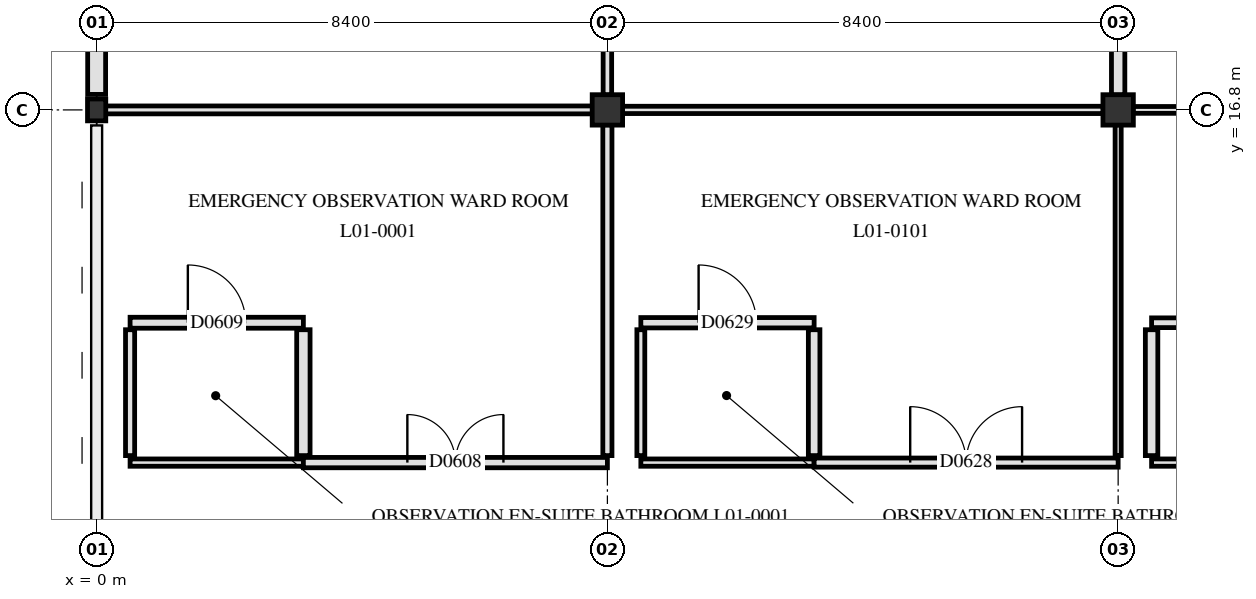
"""IFC4 building model, lengths in metres.
Left out: names, types, materials, properties, quantities, classifications, styles, units other than length and angle.
Written with IfcOpenShell. Run it as: python <this file> out.ifc"""

import sys

from ifc_helpers import new_model, si_unit, direction, frame, frame_2d, origin, origin_2d, place, context, subcontext, project, spatial, rectangle, i_section, extrude, element, fill, save


model = new_model("IFC4")
c1 = context("Model", 3, precision=1e-05, world=origin(), true_north=direction((0.0, 1.0)))
c2 = subcontext(c1, "Body", "Model", "MODEL_VIEW")
j1 = project(units=[si_unit("LENGTHUNIT", "METRE"), si_unit("PLANEANGLEUNIT", "RADIAN")], contexts=[c1])
p1 = place(None, origin())
s1 = spatial("IfcSite", under=j1, at=p1, CompositionType="ELEMENT")
p2 = place(p1, origin())
s2 = spatial("IfcBuilding", under=s1, at=p2, CompositionType="ELEMENT")
p3 = place(p2, frame((0.0, 0.0, 4.8)))
s3 = spatial("IfcBuildingStorey", under=s2, at=p3, CompositionType="ELEMENT", Elevation=4.8)
p4 = place(p3, frame((0.0, 16.8, 0.0), z_axis=(0.0, 0.0, 1.0), x_axis=(1.0, 0.0, 0.0)))
e1 = element("IfcColumn", 1, at=p4, inside=s3, PredefinedType="COLUMN", context=c2, shape_type="SweptSolid", body=[
    extrude(i_section(OverallWidth=0.3, OverallDepth=0.36, WebThickness=0.012, FlangeThickness=0.022, FilletRadius=0.027, at=origin_2d()), origin(), (0.0, 0.0, 1.0), 4.5),
])
for number, where, z_axis, x_axis in (
    (2, (8.4, 16.8, 0.0), (0.0, 0.0, 1.0), (1.0, 0.0, 0.0)),
    (3, (16.8, 16.8, 0.0), (0.0, 0.0, 1.0), (1.0, 0.0, 0.0)),
):
    element("IfcColumn", number, at=place(p3, frame(where, z_axis=z_axis, x_axis=x_axis)), inside=s3, PredefinedType="COLUMN", context=c2, shape_type="SweptSolid", body=[
        extrude(rectangle(XDim=0.5, YDim=0.5, at=origin_2d()), origin(), (0.0, 0.0, 1.0), 4.5),
    ])
p5 = place(p3, frame((0.0, 17.055, 0.0), z_axis=(0.0, 0.0, 1.0), x_axis=(0.0, 1.0, 0.0)))
e4 = element("IfcWall", 4, at=p5, inside=s3, PredefinedType="SOLIDWALL", context=c2, shape_type="SweptSolid", body=[
    extrude(rectangle(XDim=7.89, YDim=0.295, at=frame_2d((3.945, 0.0))), origin(), (0.0, 0.0, 1.0), 3.44),
])
p6 = place(p5, frame((1.347, 0.0, 0.85)))
e5 = element("IfcOpeningElement", 5, at=p6, cuts=e4, PredefinedType="OPENING", context=c2, shape_type="SweptSolid", body=[
    extrude(rectangle(XDim=1.25, YDim=1.3, at=frame_2d((0.625, 0.65))), frame((0.0, 0.157, 0.0), z_axis=(0.0, -1.0, 0.0), x_axis=(1.0, 0.0, 0.0)), (0.0, 0.0, 1.0), 0.315),
])
p7 = place(p5, frame((5.242, 0.0, 0.85)))
e6 = element("IfcOpeningElement", 6, at=p7, cuts=e4, PredefinedType="OPENING", context=c2, shape_type="SweptSolid", body=[
    extrude(rectangle(XDim=1.35, YDim=1.3, at=frame_2d((0.675, 0.65))), frame((0.0, 0.157, 0.0), z_axis=(0.0, -1.0, 0.0), x_axis=(1.0, 0.0, 0.0)), (0.0, 0.0, 1.0), 0.315),
])
p8 = place(p3, frame((0.55, 11.0, 0.0), z_axis=(0.0, 0.0, 1.0), x_axis=(1.0, 0.0, 0.0)))
e7 = element("IfcWall", 7, at=p8, inside=s3, PredefinedType="PARTITIONING", context=c2, shape_type="SweptSolid", body=[
    extrude(rectangle(XDim=2.85, YDim=0.12, at=frame_2d((1.425, 0.0))), origin(), (0.0, 0.0, 1.0), 4.14),
])
p9 = place(p3, frame((3.4, 11.0, 0.0), z_axis=(0.0, 0.0, 1.0), x_axis=(1.0, 0.0, 0.0)))
e8 = element("IfcWall", 8, at=p9, inside=s3, PredefinedType="PARTITIONING", context=c2, shape_type="SweptSolid", body=[
    extrude(rectangle(XDim=5.0, YDim=0.17, at=frame_2d((2.5, 0.0))), origin(), (0.0, 0.0, 1.0), 3.59),
])
p10 = place(p9, frame((1.71, 0.0, 0.0)))
e9 = element("IfcOpeningElement", 9, at=p10, cuts=e8, PredefinedType="OPENING", context=c2, shape_type="SweptSolid", body=[
    extrude(rectangle(XDim=1.58, YDim=2.22, at=frame_2d((0.79, 1.11))), frame((0.0, 0.095, 0.0), z_axis=(0.0, -1.0, 0.0), x_axis=(1.0, 0.0, 0.0)), (0.0, 0.0, 1.0), 0.19),
])
p11 = place(p3, frame((8.95, 11.0, 0.0), z_axis=(0.0, 0.0, 1.0), x_axis=(1.0, 0.0, 0.0)))
e10 = element("IfcWall", 10, at=p11, inside=s3, PredefinedType="PARTITIONING", context=c2, shape_type="SweptSolid", body=[
    extrude(rectangle(XDim=2.85, YDim=0.12, at=frame_2d((1.425, 0.0))), origin(), (0.0, 0.0, 1.0), 4.14),
])
p12 = place(p3, frame((11.8, 11.0, 0.0), z_axis=(0.0, 0.0, 1.0), x_axis=(1.0, 0.0, 0.0)))
e11 = element("IfcWall", 11, at=p12, inside=s3, PredefinedType="PARTITIONING", context=c2, shape_type="SweptSolid", body=[
    extrude(rectangle(XDim=5.0, YDim=0.15, at=frame_2d((2.5, 0.0))), origin(), (0.0, 0.0, 1.0), 3.59),
])
p13 = place(p12, frame((1.58, 0.0, 0.0)))
e12 = element("IfcOpeningElement", 12, at=p13, cuts=e11, PredefinedType="OPENING", context=c2, shape_type="SweptSolid", body=[
    extrude(rectangle(XDim=1.84, YDim=2.28, at=frame_2d((0.92, 1.14))), frame((0.0, 0.085, 0.0), z_axis=(0.0, -1.0, 0.0), x_axis=(1.0, 0.0, 0.0)), (0.0, 0.0, 1.0), 0.17),
])
p14 = place(p3, frame((17.35, 11.0, 0.0), z_axis=(0.0, 0.0, 1.0), x_axis=(1.0, 0.0, 0.0)))
e13 = element("IfcWall", 13, at=p14, inside=s3, PredefinedType="PARTITIONING", context=c2, shape_type="SweptSolid", body=[
    extrude(rectangle(XDim=2.85, YDim=0.12, at=frame_2d((1.425, 0.0))), origin(), (0.0, 0.0, 1.0), 4.14),
])
p15 = place(p3, frame((0.55, 13.3, 0.0), z_axis=(0.0, 0.0, 1.0), x_axis=(1.0, 0.0, 0.0)))
e14 = element("IfcWall", 14, at=p15, inside=s3, PredefinedType="PARTITIONING", context=c2, shape_type="SweptSolid", body=[
    extrude(rectangle(XDim=2.85, YDim=0.18, at=frame_2d((1.425, 0.0))), origin(), (0.0, 0.0, 1.0), 4.14),
])
p16 = place(p15, frame((0.95, 0.0, 0.0)))
e15 = element("IfcOpeningElement", 15, at=p16, cuts=e14, PredefinedType="OPENING", context=c2, shape_type="SweptSolid", body=[
    extrude(rectangle(XDim=0.95, YDim=2.1, at=frame_2d((0.475, 1.05))), frame((0.0, 0.1, 0.0), z_axis=(0.0, -1.0, 0.0), x_axis=(1.0, 0.0, 0.0)), (0.0, 0.0, 1.0), 0.2),
])
p17 = place(p3, frame((8.95, 13.3, 0.0), z_axis=(0.0, 0.0, 1.0), x_axis=(1.0, 0.0, 0.0)))
e16 = element("IfcWall", 16, at=p17, inside=s3, PredefinedType="PARTITIONING", context=c2, shape_type="SweptSolid", body=[
    extrude(rectangle(XDim=2.85, YDim=0.17, at=frame_2d((1.425, 0.0))), origin(), (0.0, 0.0, 1.0), 4.14),
])
p18 = place(p17, frame((0.95, 0.0, 0.0)))
e17 = element("IfcOpeningElement", 17, at=p18, cuts=e16, PredefinedType="OPENING", context=c2, shape_type="SweptSolid", body=[
    extrude(rectangle(XDim=0.95, YDim=2.1, at=frame_2d((0.475, 1.05))), frame((0.0, 0.095, 0.0), z_axis=(0.0, -1.0, 0.0), x_axis=(1.0, 0.0, 0.0)), (0.0, 0.0, 1.0), 0.19),
])
p19 = place(p3, frame((17.35, 13.3, 0.0), z_axis=(0.0, 0.0, 1.0), x_axis=(1.0, 0.0, 0.0)))
e18 = element("IfcWall", 18, at=p19, inside=s3, PredefinedType="PARTITIONING", context=c2, shape_type="SweptSolid", body=[
    extrude(rectangle(XDim=2.85, YDim=0.16, at=frame_2d((1.425, 0.0))), origin(), (0.0, 0.0, 1.0), 4.14),
])
p20 = place(p19, frame((0.95, 0.0, 0.0)))
e19 = element("IfcOpeningElement", 19, at=p20, cuts=e18, PredefinedType="OPENING", context=c2, shape_type="SweptSolid", body=[
    extrude(rectangle(XDim=0.95, YDim=2.1, at=frame_2d((0.475, 1.05))), frame((0.0, 0.09, 0.0), z_axis=(0.0, -1.0, 0.0), x_axis=(1.0, 0.0, 0.0)), (0.0, 0.0, 1.0), 0.18),
])
p21 = place(p3, frame((0.145, 16.8, 0.0), z_axis=(0.0, 0.0, 1.0), x_axis=(1.0, 0.0, 0.0)))
e20 = element("IfcWall", 20, at=p21, inside=s3, PredefinedType="PARTITIONING", context=c2, shape_type="SweptSolid", body=[
    extrude(rectangle(XDim=8.01, YDim=0.13, at=frame_2d((4.005, 0.0))), origin(), (0.0, 0.0, 1.0), 3.54),
])
p22 = place(p3, frame((8.645, 16.8, 0.0), z_axis=(0.0, 0.0, 1.0), x_axis=(1.0, 0.0, 0.0)))
e21 = element("IfcWall", 21, at=p22, inside=s3, PredefinedType="PARTITIONING", context=c2, shape_type="SweptSolid", body=[
    extrude(rectangle(XDim=7.91, YDim=0.12, at=frame_2d((3.955, 0.0))), origin(), (0.0, 0.0, 1.0), 3.54),
])
p23 = place(p3, frame((17.045, 16.8, 0.0), z_axis=(0.0, 0.0, 1.0), x_axis=(1.0, 0.0, 0.0)))
e22 = element("IfcWall", 22, at=p23, inside=s3, PredefinedType="PARTITIONING", context=c2, shape_type="SweptSolid", body=[
    extrude(rectangle(XDim=7.91, YDim=0.112, at=frame_2d((3.955, 0.0))), origin(), (0.0, 0.0, 1.0), 3.54),
])
p24 = place(p3, frame((0.55, 11.115, 0.0), z_axis=(0.0, 0.0, 1.0), x_axis=(0.0, 1.0, 0.0)))
e23 = element("IfcWall", 23, at=p24, inside=s3, PredefinedType="PARTITIONING", context=c2, shape_type="SweptSolid", body=[
    extrude(rectangle(XDim=2.07, YDim=0.15, at=frame_2d((1.035, 0.0))), origin(), (0.0, 0.0, 1.0), 4.14),
])
p25 = place(p3, frame((3.4, 11.115, 0.0), z_axis=(0.0, 0.0, 1.0), x_axis=(0.0, 1.0, 0.0)))
e24 = element("IfcWall", 24, at=p25, inside=s3, PredefinedType="PARTITIONING", context=c2, shape_type="SweptSolid", body=[
    extrude(rectangle(XDim=2.07, YDim=0.22, at=frame_2d((1.035, 0.0))), origin(), (0.0, 0.0, 1.0), 4.14),
])
p26 = place(p3, frame((8.4, 11.115, 0.0), z_axis=(0.0, 0.0, 1.0), x_axis=(0.0, 1.0, 0.0)))
e25 = element("IfcWall", 25, at=p26, inside=s3, PredefinedType="PARTITIONING", context=c2, shape_type="SweptSolid", body=[
    extrude(rectangle(XDim=5.44, YDim=0.15, at=frame_2d((2.72, 0.0))), origin(), (0.0, 0.0, 1.0), 3.59),
])
p27 = place(p3, frame((8.4, 17.045, 0.0), z_axis=(0.0, 0.0, 1.0), x_axis=(0.0, 1.0, 0.0)))
e26 = element("IfcWall", 26, at=p27, inside=s3, PredefinedType="PARTITIONING", context=c2, shape_type="SweptSolid", body=[
    extrude(rectangle(XDim=5.44, YDim=0.14, at=frame_2d((2.72, 0.0))), origin(), (0.0, 0.0, 1.0), 3.59),
])
p28 = place(p3, frame((8.95, 11.115, 0.0), z_axis=(0.0, 0.0, 1.0), x_axis=(0.0, 1.0, 0.0)))
e27 = element("IfcWall", 27, at=p28, inside=s3, PredefinedType="PARTITIONING", context=c2, shape_type="SweptSolid", body=[
    extrude(rectangle(XDim=2.07, YDim=0.13, at=frame_2d((1.035, 0.0))), origin(), (0.0, 0.0, 1.0), 4.14),
])
p29 = place(p3, frame((11.8, 11.115, 0.0), z_axis=(0.0, 0.0, 1.0), x_axis=(0.0, 1.0, 0.0)))
e28 = element("IfcWall", 28, at=p29, inside=s3, PredefinedType="PARTITIONING", context=c2, shape_type="SweptSolid", body=[
    extrude(rectangle(XDim=2.07, YDim=0.19, at=frame_2d((1.035, 0.0))), origin(), (0.0, 0.0, 1.0), 4.14),
])
p30 = place(p3, frame((16.8, 11.115, 0.0), z_axis=(0.0, 0.0, 1.0), x_axis=(0.0, 1.0, 0.0)))
e29 = element("IfcWall", 29, at=p30, inside=s3, PredefinedType="PARTITIONING", context=c2, shape_type="SweptSolid", body=[
    extrude(rectangle(XDim=5.44, YDim=0.1, at=frame_2d((2.72, 0.0))), origin(), (0.0, 0.0, 1.0), 3.59),
])
p31 = place(p3, frame((16.8, 17.045, 0.0), z_axis=(0.0, 0.0, 1.0), x_axis=(0.0, 1.0, 0.0)))
e30 = element("IfcWall", 30, at=p31, inside=s3, PredefinedType="PARTITIONING", context=c2, shape_type="SweptSolid", body=[
    extrude(rectangle(XDim=5.44, YDim=0.22, at=frame_2d((2.72, 0.0))), origin(), (0.0, 0.0, 1.0), 3.59),
])
p32 = place(p3, frame((17.35, 11.115, 0.0), z_axis=(0.0, 0.0, 1.0), x_axis=(0.0, 1.0, 0.0)))
e31 = element("IfcWall", 31, at=p32, inside=s3, PredefinedType="PARTITIONING", context=c2, shape_type="SweptSolid", body=[
    extrude(rectangle(XDim=2.07, YDim=0.205, at=frame_2d((1.035, 0.0))), origin(), (0.0, 0.0, 1.0), 4.14),
])
p33 = place(p10, origin())
e32 = element("IfcDoor", 32, at=p33, inside=s3, OperationType="DOUBLE_SWING_LEFT", PredefinedType="DOOR", context=c2, shape_type="SweptSolid", body=[
    extrude(rectangle(XDim=1.58, YDim=2.22, at=frame_2d((0.79, 1.11))), frame((0.0, 0.025, 0.0), z_axis=(0.0, -1.0, 0.0), x_axis=(1.0, 0.0, 0.0)), (0.0, 0.0, 1.0), 0.05),
])
fill(e9, e32)
p34 = place(p16, origin())
e33 = element("IfcDoor", 33, at=p34, inside=s3, OperationType="SINGLE_SWING_LEFT", PredefinedType="DOOR", context=c2, shape_type="SweptSolid", body=[
    extrude(rectangle(XDim=0.95, YDim=2.1, at=frame_2d((0.475, 1.05))), frame((0.0, 0.025, 0.0), z_axis=(0.0, -1.0, 0.0), x_axis=(1.0, 0.0, 0.0)), (0.0, 0.0, 1.0), 0.05),
])
fill(e15, e33)
p35 = place(p13, origin())
e34 = element("IfcDoor", 34, at=p35, inside=s3, OperationType="DOUBLE_SWING_LEFT", PredefinedType="DOOR", context=c2, shape_type="SweptSolid", body=[
    extrude(rectangle(XDim=1.84, YDim=2.28, at=frame_2d((0.92, 1.14))), frame((0.0, 0.025, 0.0), z_axis=(0.0, -1.0, 0.0), x_axis=(1.0, 0.0, 0.0)), (0.0, 0.0, 1.0), 0.05),
])
fill(e12, e34)
p36 = place(p18, origin())
e35 = element("IfcDoor", 35, at=p36, inside=s3, OperationType="SINGLE_SWING_LEFT", PredefinedType="DOOR", context=c2, shape_type="SweptSolid", body=[
    extrude(rectangle(XDim=0.95, YDim=2.1, at=frame_2d((0.475, 1.05))), frame((0.0, 0.025, 0.0), z_axis=(0.0, -1.0, 0.0), x_axis=(1.0, 0.0, 0.0)), (0.0, 0.0, 1.0), 0.05),
])
fill(e17, e35)
save(model, sys.argv[1])
